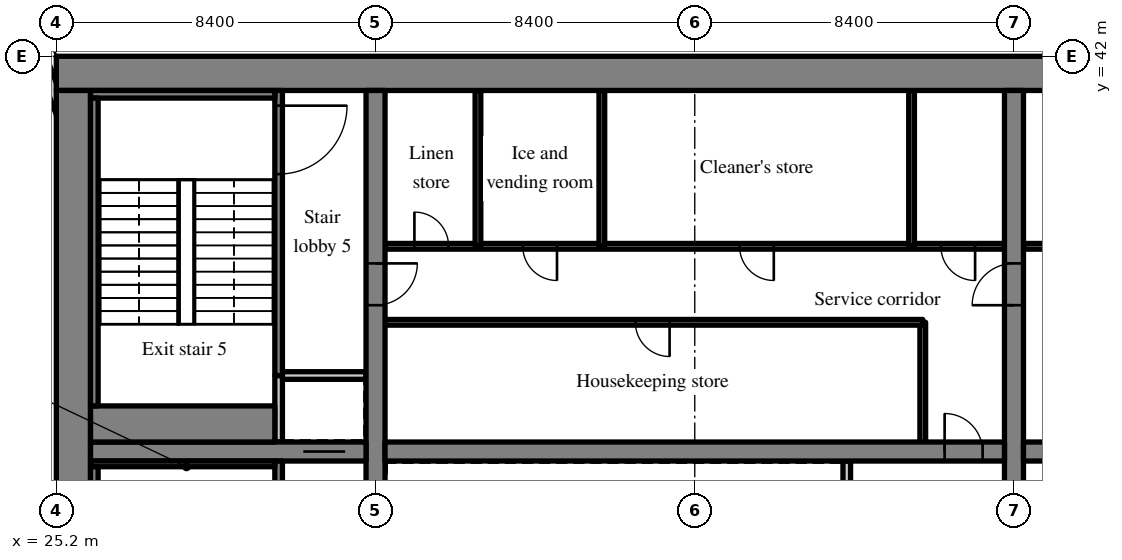
"""IFC4 building model, lengths in metres.
Left out: names, types, materials, properties, quantities, classifications, styles, units other than length and angle.
Written with IfcOpenShell. Run it as: python <this file> out.ifc"""

import sys

from ifc_helpers import new_model, si_unit, direction, frame, frame_2d, origin, place, context, subcontext, project, spatial, rectangle, extrude, source, transform, mapped, element, fill, save


model = new_model("IFC4")
c1 = context("Model", 3, precision=1e-05, world=origin(), true_north=direction((0.0, 1.0)))
c2 = subcontext(c1, "Body", "Model", "MODEL_VIEW")
j1 = project(units=[si_unit("LENGTHUNIT", "METRE"), si_unit("PLANEANGLEUNIT", "RADIAN")], contexts=[c1])
p1 = place(None, origin())
s1 = spatial("IfcSite", under=j1, at=p1, CompositionType="ELEMENT")
p2 = place(p1, origin())
s2 = spatial("IfcBuilding", under=s1, at=p2, CompositionType="ELEMENT")
p3 = place(p2, frame((0.0, 0.0, 125.6)))
s3 = spatial("IfcBuildingStorey", under=s2, at=p3, CompositionType="ELEMENT", Elevation=125.6)
m1 = source(origin(), c2, "Body", "SweptSolid", [
    extrude(rectangle(XDim=50.4, YDim=0.9, at=frame_2d((25.2, 0.0))), origin(), (0.0, 0.0, 1.0), 3.52),
])
p4 = place(p3, frame((25.2, 41.55, 0.0), z_axis=(0.0, 0.0, 1.0), x_axis=(1.0, 0.0, 0.0)))
e1 = element("IfcWall", 1, at=p4, inside=s3, PredefinedType="SHEAR", context=c2, shape_type="MappedRepresentation", body=[
    mapped(m1, transform((0.0, 0.0, 0.0), scale=1.0)),
])
m2 = source(origin(), c2, "Body", "SweptSolid", [
    extrude(rectangle(XDim=18.2, YDim=0.9, at=frame_2d((9.1, 0.0))), origin(), (0.0, 0.0, 1.0), 3.52),
])
p5 = place(p3, frame((25.65, 22.9, 0.0), z_axis=(0.0, 0.0, 1.0), x_axis=(0.0, 1.0, 0.0)))
e2 = element("IfcWall", 2, at=p5, inside=s3, PredefinedType="SHEAR", context=c2, shape_type="MappedRepresentation", body=[
    mapped(m2, transform((0.0, 0.0, 0.0), scale=1.0)),
])
m3 = source(origin(), c2, "Body", "SweptSolid", [
    extrude(rectangle(XDim=18.2, YDim=0.5, at=frame_2d((9.1, 0.0))), origin(), (0.0, 0.0, 1.0), 3.52),
])
p6 = place(p3, frame((33.6, 22.9, 0.0), z_axis=(0.0, 0.0, 1.0), x_axis=(0.0, 1.0, 0.0)))
e3 = element("IfcWall", 3, at=p6, inside=s3, PredefinedType="SHEAR", context=c2, shape_type="MappedRepresentation", body=[
    mapped(m3, transform((0.0, 0.0, 0.0), scale=1.0)),
])
m4 = source(origin(), c2, "Body", "SweptSolid", [
    extrude(rectangle(XDim=1.1, YDim=2.1, at=frame_2d((0.55, 1.05))), frame((0.0, 0.26, 0.0), z_axis=(0.0, -1.0, 0.0), x_axis=(1.0, 0.0, 0.0)), (0.0, 0.0, 1.0), 0.52),
])
p7 = place(p6, frame((12.55, 0.0, 0.0)))
e4 = element("IfcOpeningElement", 4, at=p7, cuts=e3, PredefinedType="OPENING", context=c2, shape_type="MappedRepresentation", body=[
    mapped(m4, transform((0.0, 0.0, 0.0), scale=1.0)),
])
p8 = place(p3, frame((50.4, 22.9, 0.0), z_axis=(0.0, 0.0, 1.0), x_axis=(0.0, 1.0, 0.0)))
e5 = element("IfcWall", 5, at=p8, inside=s3, PredefinedType="SHEAR", context=c2, shape_type="MappedRepresentation", body=[
    mapped(m3, transform((0.0, 0.0, 0.0), scale=1.0)),
])
p9 = place(p8, frame((12.55, 0.0, 0.0)))
e6 = element("IfcOpeningElement", 6, at=p9, cuts=e5, PredefinedType="OPENING", context=c2, shape_type="MappedRepresentation", body=[
    mapped(m4, transform((0.0, 0.0, 0.0), scale=1.0)),
])
m5 = source(origin(), c2, "Body", "SweptSolid", [
    extrude(rectangle(XDim=7.25, YDim=0.5, at=frame_2d((3.625, 0.0))), origin(), (0.0, 0.0, 1.0), 3.52),
])
p10 = place(p3, frame((26.1, 31.6, 0.0), z_axis=(0.0, 0.0, 1.0), x_axis=(1.0, 0.0, 0.0)))
e7 = element("IfcWall", 7, at=p10, inside=s3, PredefinedType="SHEAR", context=c2, shape_type="MappedRepresentation", body=[
    mapped(m5, transform((0.0, 0.0, 0.0), scale=1.0)),
])
p11 = place(p10, frame((5.6, 0.0, 0.0)))
e8 = element("IfcOpeningElement", 8, at=p11, cuts=e7, PredefinedType="OPENING", context=c2, shape_type="MappedRepresentation", body=[
    mapped(m4, transform((0.0, 0.0, 0.0), scale=1.0)),
])
m6 = source(origin(), c2, "Body", "SweptSolid", [
    extrude(rectangle(XDim=16.3, YDim=0.5, at=frame_2d((8.15, 0.0))), origin(), (0.0, 0.0, 1.0), 3.52),
])
p12 = place(p3, frame((33.85, 31.6, 0.0), z_axis=(0.0, 0.0, 1.0), x_axis=(1.0, 0.0, 0.0)))
e9 = element("IfcWall", 9, at=p12, inside=s3, PredefinedType="SHEAR", context=c2, shape_type="MappedRepresentation", body=[
    mapped(m6, transform((0.0, 0.0, 0.0), scale=1.0)),
])
m7 = source(origin(), c2, "Body", "SweptSolid", [
    extrude(rectangle(XDim=1.0, YDim=2.1, at=frame_2d((0.5, 1.05))), frame((0.0, 0.26, 0.0), z_axis=(0.0, -1.0, 0.0), x_axis=(1.0, 0.0, 0.0)), (0.0, 0.0, 1.0), 0.52),
])
p13 = place(p12, frame((14.725, 0.0, 0.0)))
e10 = element("IfcOpeningElement", 10, at=p13, cuts=e9, PredefinedType="OPENING", context=c2, shape_type="MappedRepresentation", body=[
    mapped(m7, transform((0.0, 0.0, 0.0), scale=1.0)),
])
m8 = source(origin(), c2, "Body", "SweptSolid", [
    extrude(rectangle(XDim=16.3, YDim=0.5, at=frame_2d((8.15, 0.0))), origin(), (0.0, 0.0, 1.0), 3.52),
])
p14 = place(p3, frame((50.65, 31.6, 0.0), z_axis=(0.0, 0.0, 1.0), x_axis=(1.0, 0.0, 0.0)))
e11 = element("IfcWall", 11, at=p14, inside=s3, PredefinedType="SHEAR", context=c2, shape_type="MappedRepresentation", body=[
    mapped(m8, transform((0.0, 0.0, 0.0), scale=1.0)),
])
p15 = place(p14, frame((0.575, 0.0, 0.0)))
e12 = element("IfcOpeningElement", 12, at=p15, cuts=e11, PredefinedType="OPENING", context=c2, shape_type="MappedRepresentation", body=[
    mapped(m7, transform((0.0, 0.0, 0.0), scale=1.0)),
])
m9 = source(origin(), c2, "Body", "SweptSolid", [
    extrude(rectangle(XDim=3.559, YDim=0.3, at=frame_2d((1.78, 0.0))), origin(), (0.0, 0.0, 1.0), 3.52),
])
p16 = place(p3, frame((25.55, 39.969, 0.0), z_axis=(0.0, 0.0, 1.0), x_axis=(-0.35779745313, 0.933799219604, 0.0)))
e13 = element("IfcWall", 13, at=p16, inside=s3, PredefinedType="SOLIDWALL", context=c2, shape_type="MappedRepresentation", body=[
    mapped(m9, transform((0.0, 0.0, 0.0), scale=1.0)),
])
m10 = source(origin(), c2, "Body", "SweptSolid", [
    extrude(rectangle(XDim=1.5, YDim=2.0, at=frame_2d((0.75, 1.0))), frame((0.0, 0.16, 0.0), z_axis=(0.0, -1.0, 0.0), x_axis=(1.0, 0.0, 0.0)), (0.0, 0.0, 1.0), 0.32),
])
p17 = place(p16, frame((1.903, 0.0, 0.9)))
e14 = element("IfcOpeningElement", 14, at=p17, cuts=e13, PredefinedType="OPENING", context=c2, shape_type="MappedRepresentation", body=[
    mapped(m10, transform((0.0, 0.0, 0.0), scale=1.0)),
])
m11 = source(origin(), c2, "Body", "SweptSolid", [
    extrude(rectangle(XDim=2.55, YDim=0.2, at=frame_2d((1.275, 0.0))), origin(), (0.0, 0.0, 1.0), 3.52),
])
p18 = place(p3, frame((46.0, 28.8, 0.0), z_axis=(0.0, 0.0, 1.0), x_axis=(0.0, 1.0, 0.0)))
e15 = element("IfcWall", 15, at=p18, inside=s3, PredefinedType="SOLIDWALL", context=c2, shape_type="MappedRepresentation", body=[
    mapped(m11, transform((0.0, 0.0, 0.0), scale=1.0)),
])
m12 = source(origin(), c2, "Body", "SweptSolid", [
    extrude(rectangle(XDim=3.15, YDim=0.15, at=frame_2d((1.575, 0.0))), origin(), (0.0, 0.0, 1.0), 3.52),
])
p19 = place(p3, frame((48.0, 31.85, 0.0), z_axis=(0.0, 0.0, 1.0), x_axis=(0.0, 1.0, 0.0)))
e16 = element("IfcWall", 16, at=p19, inside=s3, PredefinedType="PARTITIONING", context=c2, shape_type="MappedRepresentation", body=[
    mapped(m12, transform((0.0, 0.0, 0.0), scale=1.0)),
])
m13 = source(origin(), c2, "Body", "SweptSolid", [
    extrude(rectangle(XDim=14.15, YDim=0.15, at=frame_2d((7.075, 0.0))), origin(), (0.0, 0.0, 1.0), 3.52),
])
p20 = place(p3, frame((33.85, 35.0, 0.0), z_axis=(0.0, 0.0, 1.0), x_axis=(1.0, 0.0, 0.0)))
e17 = element("IfcWall", 17, at=p20, inside=s3, PredefinedType="PARTITIONING", context=c2, shape_type="MappedRepresentation", body=[
    mapped(m13, transform((0.0, 0.0, 0.0), scale=1.0)),
])
m14 = source(origin(), c2, "Body", "SweptSolid", [
    extrude(rectangle(XDim=0.9, YDim=2.1, at=frame_2d((0.45, 1.05))), frame((0.0, 0.085, 0.0), z_axis=(0.0, -1.0, 0.0), x_axis=(1.0, 0.0, 0.0)), (0.0, 0.0, 1.0), 0.17),
])
p21 = place(p20, frame((6.588, 0.0, 0.0)))
e18 = element("IfcOpeningElement", 18, at=p21, cuts=e17, PredefinedType="OPENING", context=c2, shape_type="MappedRepresentation", body=[
    mapped(m14, transform((0.0, 0.0, 0.0), scale=1.0)),
])
m15 = source(origin(), c2, "Body", "SweptSolid", [
    extrude(rectangle(XDim=16.3, YDim=0.15, at=frame_2d((8.15, 0.0))), origin(), (0.0, 0.0, 1.0), 3.52),
])
p22 = place(p3, frame((33.85, 37.0, 0.0), z_axis=(0.0, 0.0, 1.0), x_axis=(1.0, 0.0, 0.0)))
e19 = element("IfcWall", 19, at=p22, inside=s3, PredefinedType="PARTITIONING", context=c2, shape_type="MappedRepresentation", body=[
    mapped(m15, transform((0.0, 0.0, 0.0), scale=1.0)),
])
p23 = place(p22, frame((0.773, 0.0, 0.0)))
e20 = element("IfcOpeningElement", 20, at=p23, cuts=e19, PredefinedType="OPENING", context=c2, shape_type="MappedRepresentation", body=[
    mapped(m14, transform((0.0, 0.0, 0.0), scale=1.0)),
])
p24 = place(p22, frame((3.625, 0.0, 0.0)))
e21 = element("IfcOpeningElement", 21, at=p24, cuts=e19, PredefinedType="OPENING", context=c2, shape_type="MappedRepresentation", body=[
    mapped(m14, transform((0.0, 0.0, 0.0), scale=1.0)),
])
p25 = place(p22, frame((9.33, 0.0, 0.0)))
e22 = element("IfcOpeningElement", 22, at=p25, cuts=e19, PredefinedType="OPENING", context=c2, shape_type="MappedRepresentation", body=[
    mapped(m14, transform((0.0, 0.0, 0.0), scale=1.0)),
])
p26 = place(p22, frame((14.627, 0.0, 0.0)))
e23 = element("IfcOpeningElement", 23, at=p26, cuts=e19, PredefinedType="OPENING", context=c2, shape_type="MappedRepresentation", body=[
    mapped(m14, transform((0.0, 0.0, 0.0), scale=1.0)),
])
m16 = source(origin(), c2, "Body", "SweptSolid", [
    extrude(rectangle(XDim=4.1, YDim=0.15, at=frame_2d((2.05, 0.0))), origin(), (0.0, 0.0, 1.0), 3.52),
])
for number, where, z_axis, x_axis in (
    (24, (36.295, 37.0, 0.0), (0.0, 0.0, 1.0), (0.0, 1.0, 0.0)),
    (25, (39.555, 37.0, 0.0), (0.0, 0.0, 1.0), (0.0, 1.0, 0.0)),
    (26, (47.705, 37.0, 0.0), (0.0, 0.0, 1.0), (0.0, 1.0, 0.0)),
):
    element("IfcWall", number, at=place(p3, frame(where, z_axis=z_axis, x_axis=x_axis)), inside=s3, PredefinedType="PARTITIONING", context=c2, shape_type="MappedRepresentation", body=[
        mapped(m16, transform((0.0, 0.0, 0.0), scale=1.0)),
    ])
m17 = source(origin(), c2, "Body", "SweptSolid", [
    extrude(rectangle(XDim=16.3, YDim=0.15, at=frame_2d((8.15, 0.0))), origin(), (0.0, 0.0, 1.0), 3.52),
])
p27 = place(p3, frame((66.95, 37.0, 0.0), z_axis=(0.0, 0.0, 1.0), x_axis=(-1.0, 0.0, 0.0)))
e27 = element("IfcWall", 27, at=p27, inside=s3, PredefinedType="PARTITIONING", context=c2, shape_type="MappedRepresentation", body=[
    mapped(m17, transform((0.0, 0.0, 0.0), scale=1.0)),
])
p28 = place(p27, frame((6.478, 0.0, 0.0)))
e28 = element("IfcOpeningElement", 28, at=p28, cuts=e27, PredefinedType="OPENING", context=c2, shape_type="MappedRepresentation", body=[
    mapped(m14, transform((0.0, 0.0, 0.0), scale=1.0)),
])
p29 = place(p27, frame((14.627, 0.0, 0.0)))
e29 = element("IfcOpeningElement", 29, at=p29, cuts=e27, PredefinedType="OPENING", context=c2, shape_type="MappedRepresentation", body=[
    mapped(m14, transform((0.0, 0.0, 0.0), scale=1.0)),
])
m18 = source(origin(), c2, "Body", "SweptSolid", [
    extrude(rectangle(XDim=8.45, YDim=0.2, at=frame_2d((4.225, 0.0))), origin(), (0.0, 0.0, 1.0), 3.52),
])
p30 = place(p3, frame((31.05, 22.9, 0.0), z_axis=(0.0, 0.0, 1.0), x_axis=(0.0, 1.0, 0.0)))
e30 = element("IfcWall", 30, at=p30, inside=s3, PredefinedType="SOLIDWALL", context=c2, shape_type="MappedRepresentation", body=[
    mapped(m18, transform((0.0, 0.0, 0.0), scale=1.0)),
])
m19 = source(origin(), c2, "Body", "SweptSolid", [
    extrude(rectangle(XDim=1.2, YDim=2.1, at=frame_2d((0.6, 1.05))), frame((0.0, 0.11, 0.0), z_axis=(0.0, -1.0, 0.0), x_axis=(1.0, 0.0, 0.0)), (0.0, 0.0, 1.0), 0.22),
])
p31 = place(p30, frame((6.6, 0.0, 0.0)))
e31 = element("IfcOpeningElement", 31, at=p31, cuts=e30, PredefinedType="OPENING", context=c2, shape_type="MappedRepresentation", body=[
    mapped(m19, transform((0.0, 0.0, 0.0), scale=1.0)),
])
m20 = source(origin(), c2, "Body", "SweptSolid", [
    extrude(rectangle(XDim=1.75, YDim=0.2, at=frame_2d((0.875, 0.0))), origin(), (0.0, 0.0, 1.0), 3.52),
])
p32 = place(p3, frame((31.05, 31.85, 0.0), z_axis=(0.0, 0.0, 1.0), x_axis=(0.0, 1.0, 0.0)))
e32 = element("IfcWall", 32, at=p32, inside=s3, PredefinedType="SOLIDWALL", context=c2, shape_type="MappedRepresentation", body=[
    mapped(m20, transform((0.0, 0.0, 0.0), scale=1.0)),
])
m21 = source(origin(), c2, "Body", "SweptSolid", [
    extrude(rectangle(XDim=2.2, YDim=0.2, at=frame_2d((1.1, 0.0))), origin(), (0.0, 0.0, 1.0), 3.52),
])
p33 = place(p3, frame((31.15, 33.6, 0.0), z_axis=(0.0, 0.0, 1.0), x_axis=(1.0, 0.0, 0.0)))
e33 = element("IfcWall", 33, at=p33, inside=s3, PredefinedType="SOLIDWALL", context=c2, shape_type="MappedRepresentation", body=[
    mapped(m21, transform((0.0, 0.0, 0.0), scale=1.0)),
])
m22 = source(origin(), c2, "Body", "SweptSolid", [
    extrude(rectangle(XDim=7.5, YDim=0.2, at=frame_2d((3.75, 0.0))), origin(), (0.0, 0.0, 1.0), 3.52),
])
p34 = place(p3, frame((31.05, 33.6, 0.0), z_axis=(0.0, 0.0, 1.0), x_axis=(0.0, 1.0, 0.0)))
e34 = element("IfcWall", 34, at=p34, inside=s3, PredefinedType="SOLIDWALL", context=c2, shape_type="MappedRepresentation", body=[
    mapped(m22, transform((0.0, 0.0, 0.0), scale=1.0)),
])
m23 = source(origin(), c2, "Body", "SweptSolid", [
    extrude(rectangle(XDim=1.8, YDim=2.1, at=frame_2d((0.9, 1.05))), frame((0.0, 0.11, 0.0), z_axis=(0.0, -1.0, 0.0), x_axis=(1.0, 0.0, 0.0)), (0.0, 0.0, 1.0), 0.22),
])
p35 = place(p34, frame((5.3, 0.0, 0.0)))
e35 = element("IfcOpeningElement", 35, at=p35, cuts=e34, PredefinedType="OPENING", context=c2, shape_type="MappedRepresentation", body=[
    mapped(m23, transform((0.0, 0.0, 0.0), scale=1.0)),
])
m24 = source(origin(), c2, "Body", "SweptSolid", [
    extrude(rectangle(XDim=4.85, YDim=0.15, at=frame_2d((2.425, 0.0))), origin(), (0.0, 0.0, 1.0), 3.52),
])
p36 = place(p3, frame((26.1, 31.275, 0.0), z_axis=(0.0, 0.0, 1.0), x_axis=(1.0, 0.0, 0.0)))
e36 = element("IfcWall", 36, at=p36, inside=s3, PredefinedType="SOLIDWALL", context=c2, shape_type="MappedRepresentation", body=[
    mapped(m24, transform((0.0, 0.0, 0.0), scale=1.0)),
])
m25 = source(origin(), c2, "Body", "SweptSolid", [
    extrude(rectangle(XDim=8.1, YDim=0.2, at=frame_2d((4.05, 0.0))), origin(), (0.0, 0.0, 1.0), 3.52),
])
p37 = place(p3, frame((26.2, 23.1, 0.0), z_axis=(0.0, 0.0, 1.0), x_axis=(0.0, 1.0, 0.0)))
e37 = element("IfcWall", 37, at=p37, inside=s3, PredefinedType="SOLIDWALL", context=c2, shape_type="MappedRepresentation", body=[
    mapped(m25, transform((0.0, 0.0, 0.0), scale=1.0)),
])
m26 = source(origin(), c2, "Body", "SweptSolid", [
    extrude(rectangle(XDim=4.85, YDim=0.2, at=frame_2d((2.425, 0.0))), origin(), (0.0, 0.0, 1.0), 3.52),
])
p38 = place(p3, frame((26.1, 41.0, 0.0), z_axis=(0.0, 0.0, 1.0), x_axis=(1.0, 0.0, 0.0)))
e38 = element("IfcWall", 38, at=p38, inside=s3, PredefinedType="SOLIDWALL", context=c2, shape_type="MappedRepresentation", body=[
    mapped(m26, transform((0.0, 0.0, 0.0), scale=1.0)),
])
m27 = source(origin(), c2, "Body", "SweptSolid", [
    extrude(rectangle(XDim=4.85, YDim=0.95, at=frame_2d((2.425, 0.0))), origin(), (0.0, 0.0, 1.0), 3.52),
])
p39 = place(p3, frame((26.1, 32.325, 0.0), z_axis=(0.0, 0.0, 1.0), x_axis=(1.0, 0.0, 0.0)))
e39 = element("IfcWall", 39, at=p39, inside=s3, PredefinedType="SOLIDWALL", context=c2, shape_type="MappedRepresentation", body=[
    mapped(m27, transform((0.0, 0.0, 0.0), scale=1.0)),
])
p40 = place(p3, frame((26.2, 32.8, 0.0), z_axis=(0.0, 0.0, 1.0), x_axis=(0.0, 1.0, 0.0)))
e40 = element("IfcWall", 40, at=p40, inside=s3, PredefinedType="SOLIDWALL", context=c2, shape_type="MappedRepresentation", body=[
    mapped(m25, transform((0.0, 0.0, 0.0), scale=1.0)),
])
m28 = source(origin(), c2, "Body", "SweptSolid", [
    extrude(rectangle(XDim=1.0, YDim=2.1, at=frame_2d((0.5, 1.05))), frame((0.0, 0.025, 0.0), z_axis=(0.0, -1.0, 0.0), x_axis=(1.0, 0.0, 0.0)), (0.0, 0.0, 1.0), 0.05),
])
p41 = place(p13, origin())
e41 = element("IfcDoor", 41, at=p41, inside=s3, OperationType="SINGLE_SWING_LEFT", PredefinedType="DOOR", context=c2, shape_type="MappedRepresentation", body=[
    mapped(m28, transform((0.0, 0.0, 0.0), scale=1.0)),
])
fill(e10, e41)
m29 = source(origin(), c2, "Body", "SweptSolid", [
    extrude(rectangle(XDim=0.9, YDim=2.1, at=frame_2d((0.45, 1.05))), frame((0.0, 0.025, 0.0), z_axis=(0.0, -1.0, 0.0), x_axis=(1.0, 0.0, 0.0)), (0.0, 0.0, 1.0), 0.05),
])
p42 = place(p21, origin())
e42 = element("IfcDoor", 42, at=p42, inside=s3, OperationType="SINGLE_SWING_RIGHT", PredefinedType="DOOR", context=c2, shape_type="MappedRepresentation", body=[
    mapped(m29, transform((0.0, 0.0, 0.0), scale=1.0)),
])
fill(e18, e42)
p43 = place(p23, origin())
e43 = element("IfcDoor", 43, at=p43, inside=s3, OperationType="SINGLE_SWING_LEFT", PredefinedType="DOOR", context=c2, shape_type="MappedRepresentation", body=[
    mapped(m29, transform((0.0, 0.0, 0.0), scale=1.0)),
])
fill(e20, e43)
p44 = place(p24, origin())
e44 = element("IfcDoor", 44, at=p44, inside=s3, OperationType="SINGLE_SWING_RIGHT", PredefinedType="DOOR", context=c2, shape_type="MappedRepresentation", body=[
    mapped(m29, transform((0.0, 0.0, 0.0), scale=1.0)),
])
fill(e21, e44)
p45 = place(p25, origin())
e45 = element("IfcDoor", 45, at=p45, inside=s3, OperationType="SINGLE_SWING_RIGHT", PredefinedType="DOOR", context=c2, shape_type="MappedRepresentation", body=[
    mapped(m29, transform((0.0, 0.0, 0.0), scale=1.0)),
])
fill(e22, e45)
p46 = place(p26, origin())
e46 = element("IfcDoor", 46, at=p46, inside=s3, OperationType="SINGLE_SWING_RIGHT", PredefinedType="DOOR", context=c2, shape_type="MappedRepresentation", body=[
    mapped(m29, transform((0.0, 0.0, 0.0), scale=1.0)),
])
fill(e23, e46)
m30 = source(origin(), c2, "Body", "SweptSolid", [
    extrude(rectangle(XDim=1.1, YDim=2.1, at=frame_2d((0.55, 1.05))), frame((0.0, 0.025, 0.0), z_axis=(0.0, -1.0, 0.0), x_axis=(1.0, 0.0, 0.0)), (0.0, 0.0, 1.0), 0.05),
])
p47 = place(p11, origin())
e47 = element("IfcDoor", 47, at=p47, inside=s3, OperationType="SLIDING_TO_LEFT", PredefinedType="DOOR", context=c2, shape_type="MappedRepresentation", body=[
    mapped(m30, transform((0.0, 0.0, 0.0), scale=1.0)),
])
fill(e8, e47)
m31 = source(origin(), c2, "Body", "SweptSolid", [
    extrude(rectangle(XDim=1.8, YDim=2.1, at=frame_2d((0.9, 1.05))), frame((0.0, 0.025, 0.0), z_axis=(0.0, -1.0, 0.0), x_axis=(1.0, 0.0, 0.0)), (0.0, 0.0, 1.0), 0.05),
])
p48 = place(p35, origin())
e48 = element("IfcDoor", 48, at=p48, inside=s3, OperationType="SINGLE_SWING_RIGHT", PredefinedType="DOOR", context=c2, shape_type="MappedRepresentation", body=[
    mapped(m31, transform((0.0, 0.0, 0.0), scale=1.0)),
])
fill(e35, e48)
p49 = place(p7, origin())
e49 = element("IfcDoor", 49, at=p49, inside=s3, OperationType="SINGLE_SWING_RIGHT", PredefinedType="DOOR", context=c2, shape_type="MappedRepresentation", body=[
    mapped(m30, transform((0.0, 0.0, 0.0), scale=1.0)),
])
fill(e4, e49)
p50 = place(p9, origin())
e50 = element("IfcDoor", 50, at=p50, inside=s3, OperationType="SINGLE_SWING_LEFT", PredefinedType="DOOR", context=c2, shape_type="MappedRepresentation", body=[
    mapped(m30, transform((0.0, 0.0, 0.0), scale=1.0)),
])
fill(e6, e50)
save(model, sys.argv[1])
